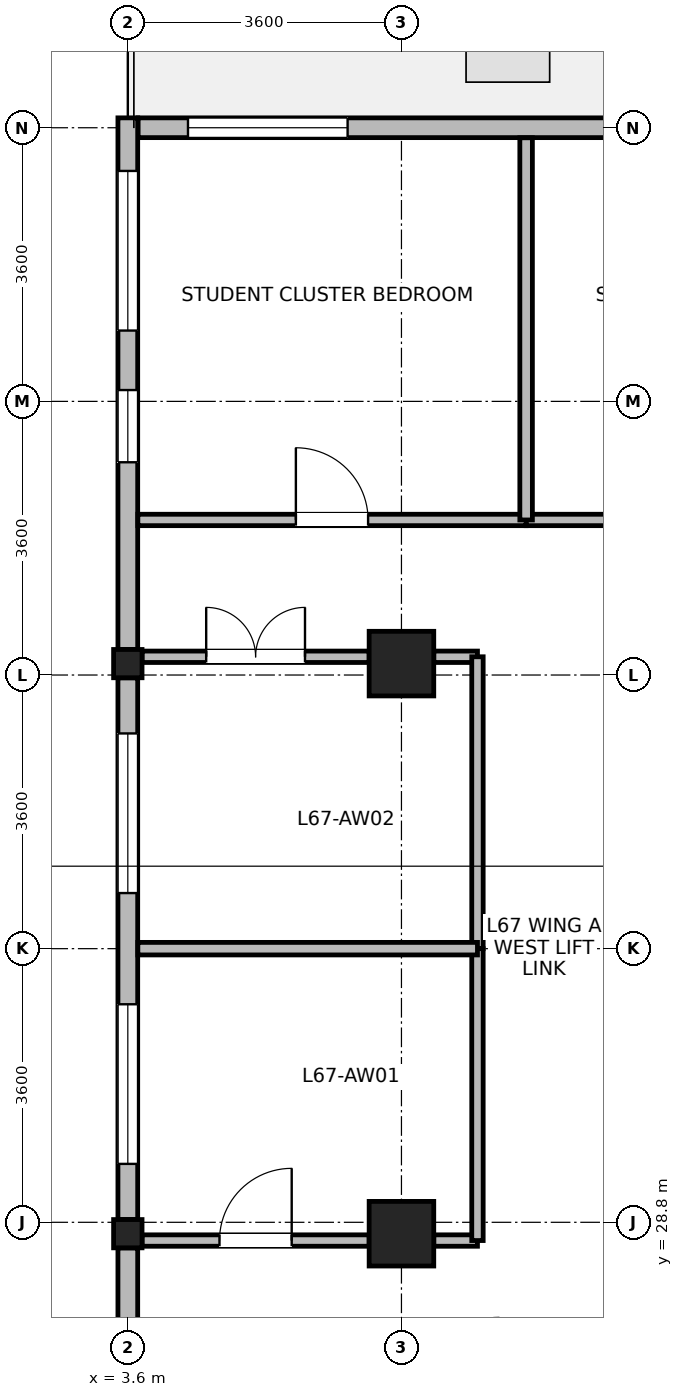
"""IFC4 building model, lengths in metres.
Left out: names, types, materials, properties, quantities, classifications, styles, units other than length and angle.
Written with IfcOpenShell. Run it as: python <this file> out.ifc"""

import sys

from ifc_helpers import new_model, si_unit, direction, frame, frame_2d, origin, origin_2d, place, context, subcontext, project, spatial, rectangle, i_section, extrude, source, transform, mapped, element, fill, save


model = new_model("IFC4")
c1 = context("Model", 3, precision=1e-05, world=origin(), true_north=direction((0.0, 1.0)))
c2 = subcontext(c1, "Body", "Model", "MODEL_VIEW")
j1 = project(units=[si_unit("LENGTHUNIT", "METRE"), si_unit("PLANEANGLEUNIT", "RADIAN")], contexts=[c1])
p1 = place(None, origin())
s1 = spatial("IfcSite", under=j1, at=p1, CompositionType="ELEMENT")
p2 = place(p1, origin())
s2 = spatial("IfcBuilding", under=s1, at=p2, CompositionType="ELEMENT")
p3 = place(p2, frame((0.0, 0.0, 261.0)))
s3 = spatial("IfcBuildingStorey", under=s2, at=p3, CompositionType="ELEMENT", Elevation=261.0)
m1 = source(origin(), c2, "Body", "SweptSolid", [
    extrude(rectangle(XDim=0.85, YDim=0.85, at=origin_2d()), origin(), (0.0, 0.0, 1.0), 3.7),
])
for number, where, z_axis, x_axis in (
    (1, (7.2, 28.65, 0.0), (0.0, 0.0, 1.0), (1.0, 0.0, 0.0)),
    (2, (7.2, 36.15, 0.0), (0.0, 0.0, 1.0), (1.0, 0.0, 0.0)),
):
    element("IfcColumn", number, at=place(p3, frame(where, z_axis=z_axis, x_axis=x_axis)), inside=s3, PredefinedType="COLUMN", context=c2, shape_type="MappedRepresentation", body=[
        mapped(m1, transform((0.0, 0.0, 0.0), x_axis=(1.0, 0.0, 0.0), y_axis=(0.0, 1.0, 0.0), z_axis=(0.0, 0.0, 1.0), scale=1.0)),
    ])
m2 = source(origin(), c2, "Body", "SweptSolid", [
    extrude(i_section(OverallWidth=0.374, OverallDepth=0.372, WebThickness=0.015, FlangeThickness=0.026, FilletRadius=0.015, at=origin_2d()), origin(), (0.0, 0.0, 1.0), 3.7),
])
for number, where, z_axis, x_axis in (
    (3, (3.6, 28.65, 0.0), (0.0, 0.0, 1.0), (1.0, 0.0, 0.0)),
    (4, (3.6, 36.15, 0.0), (0.0, 0.0, 1.0), (1.0, 0.0, 0.0)),
):
    element("IfcColumn", number, at=place(p3, frame(where, z_axis=z_axis, x_axis=x_axis)), inside=s3, PredefinedType="COLUMN", context=c2, shape_type="MappedRepresentation", body=[
        mapped(m2, transform((0.0, 0.0, 0.0), x_axis=(1.0, 0.0, 0.0), y_axis=(0.0, 1.0, 0.0), z_axis=(0.0, 0.0, 1.0), scale=1.0)),
    ])
p4 = place(p3, frame((3.735, 43.2, 0.0), z_axis=(0.0, 0.0, 1.0), x_axis=(1.0, 0.0, 0.0)))
e5 = element("IfcWall", 5, at=p4, inside=s3, PredefinedType="STANDARD", context=c2, shape_type="SweptSolid", body=[
    extrude(rectangle(XDim=10.239, YDim=0.26, at=frame_2d((5.12, 0.0))), origin(), (0.0, 0.0, 1.0), 3.455),
])
p5 = place(p4, frame((0.656, 0.0, 0.85)))
e6 = element("IfcOpeningElement", 6, at=p5, cuts=e5, PredefinedType="OPENING", context=c2, shape_type="SweptSolid", body=[
    extrude(rectangle(XDim=2.1, YDim=1.95, at=frame_2d((1.05, 0.975))), frame((0.0, 0.14, 0.0), z_axis=(0.0, -1.0, 0.0), x_axis=(1.0, 0.0, 0.0)), (0.0, 0.0, 1.0), 0.28),
])
p6 = place(p4, frame((7.482, 0.0, 0.85)))
e7 = element("IfcOpeningElement", 7, at=p6, cuts=e5, PredefinedType="OPENING", context=c2, shape_type="SweptSolid", body=[
    extrude(rectangle(XDim=2.1, YDim=1.95, at=frame_2d((1.05, 0.975))), frame((0.0, 0.14, 0.0), z_axis=(0.0, -1.0, 0.0), x_axis=(1.0, 0.0, 0.0)), (0.0, 0.0, 1.0), 0.28),
])
p7 = place(p3, frame((3.6, 36.337, 0.0), z_axis=(0.0, 0.0, 1.0), x_axis=(0.0, 1.0, 0.0)))
e8 = element("IfcWall", 8, at=p7, inside=s3, PredefinedType="STANDARD", context=c2, shape_type="SweptSolid", body=[
    extrude(rectangle(XDim=6.993, YDim=0.26, at=frame_2d((3.497, 0.0))), origin(), (0.0, 0.0, 1.0), 3.455),
])
p8 = place(p7, frame((4.195, 0.0, 0.85)))
e9 = element("IfcOpeningElement", 9, at=p8, cuts=e8, PredefinedType="OPENING", context=c2, shape_type="SweptSolid", body=[
    extrude(rectangle(XDim=2.1, YDim=1.95, at=frame_2d((1.05, 0.975))), frame((0.0, 0.14, 0.0), z_axis=(0.0, -1.0, 0.0), x_axis=(1.0, 0.0, 0.0)), (0.0, 0.0, 1.0), 0.28),
])
p9 = place(p7, frame((2.462, 0.0, 0.85)))
e10 = element("IfcOpeningElement", 10, at=p9, cuts=e8, PredefinedType="OPENING", context=c2, shape_type="SweptSolid", body=[
    extrude(rectangle(XDim=0.95, YDim=1.75, at=frame_2d((0.475, 0.875))), frame((0.0, 0.14, 0.0), z_axis=(0.0, -1.0, 0.0), x_axis=(1.0, 0.0, 0.0)), (0.0, 0.0, 1.0), 0.28),
])
p10 = place(p3, frame((3.6, 28.837, 0.0), z_axis=(0.0, 0.0, 1.0), x_axis=(0.0, 1.0, 0.0)))
e11 = element("IfcWall", 11, at=p10, inside=s3, PredefinedType="STANDARD", context=c2, shape_type="SweptSolid", body=[
    extrude(rectangle(XDim=7.126, YDim=0.26, at=frame_2d((3.563, 0.0))), origin(), (0.0, 0.0, 1.0), 3.055),
])
p11 = place(p10, frame((0.731, 0.0, 0.85)))
e12 = element("IfcOpeningElement", 12, at=p11, cuts=e11, PredefinedType="OPENING", context=c2, shape_type="SweptSolid", body=[
    extrude(rectangle(XDim=2.1, YDim=1.95, at=frame_2d((1.05, 0.975))), frame((0.0, 0.14, 0.0), z_axis=(0.0, -1.0, 0.0), x_axis=(1.0, 0.0, 0.0)), (0.0, 0.0, 1.0), 0.28),
])
p12 = place(p10, frame((4.294, 0.0, 0.85)))
e13 = element("IfcOpeningElement", 13, at=p12, cuts=e11, PredefinedType="OPENING", context=c2, shape_type="SweptSolid", body=[
    extrude(rectangle(XDim=2.1, YDim=1.95, at=frame_2d((1.05, 0.975))), frame((0.0, 0.14, 0.0), z_axis=(0.0, -1.0, 0.0), x_axis=(1.0, 0.0, 0.0)), (0.0, 0.0, 1.0), 0.28),
])
p13 = place(p3, frame((3.6, 21.47, 0.0), z_axis=(0.0, 0.0, 1.0), x_axis=(0.0, 1.0, 0.0)))
e14 = element("IfcWall", 14, at=p13, inside=s3, PredefinedType="STANDARD", context=c2, shape_type="SweptSolid", body=[
    extrude(rectangle(XDim=6.993, YDim=0.26, at=frame_2d((3.497, 0.0))), origin(), (0.0, 0.0, 1.0), 3.455),
])
p14 = place(p13, frame((0.698, 0.0, 0.85)))
e15 = element("IfcOpeningElement", 15, at=p14, cuts=e14, PredefinedType="OPENING", context=c2, shape_type="SweptSolid", body=[
    extrude(rectangle(XDim=2.1, YDim=1.95, at=frame_2d((1.05, 0.975))), frame((0.0, 0.14, 0.0), z_axis=(0.0, -1.0, 0.0), x_axis=(1.0, 0.0, 0.0)), (0.0, 0.0, 1.0), 0.28),
])
p15 = place(p13, frame((3.581, 0.0, 0.85)))
e16 = element("IfcOpeningElement", 16, at=p15, cuts=e14, PredefinedType="OPENING", context=c2, shape_type="SweptSolid", body=[
    extrude(rectangle(XDim=0.95, YDim=1.75, at=frame_2d((0.475, 0.875))), frame((0.0, 0.14, 0.0), z_axis=(0.0, -1.0, 0.0), x_axis=(1.0, 0.0, 0.0)), (0.0, 0.0, 1.0), 0.28),
])
p16 = place(p3, frame((8.84, 38.04, 0.0), z_axis=(0.0, 0.0, 1.0), x_axis=(1.0, 0.0, 0.0)))
e17 = element("IfcWall", 17, at=p16, inside=s3, PredefinedType="PARTITIONING", context=c2, shape_type="SweptSolid", body=[
    extrude(rectangle(XDim=5.66, YDim=0.15, at=frame_2d((2.83, 0.0))), origin(), (0.0, 0.0, 1.0), 3.455),
])
p17 = place(p16, frame((2.355, 0.0, 0.0)))
e18 = element("IfcOpeningElement", 18, at=p17, cuts=e17, PredefinedType="OPENING", context=c2, shape_type="SweptSolid", body=[
    extrude(rectangle(XDim=0.95, YDim=2.1, at=frame_2d((0.475, 1.05))), frame((0.0, 0.085, 0.0), z_axis=(0.0, -1.0, 0.0), x_axis=(1.0, 0.0, 0.0)), (0.0, 0.0, 1.0), 0.17),
])
p18 = place(p3, frame((3.732, 38.04, 0.0), z_axis=(0.0, 0.0, 1.0), x_axis=(1.0, 0.0, 0.0)))
e19 = element("IfcWall", 19, at=p18, inside=s3, PredefinedType="PARTITIONING", context=c2, shape_type="SweptSolid", body=[
    extrude(rectangle(XDim=5.108, YDim=0.15, at=frame_2d((2.554, 0.0))), origin(), (0.0, 0.0, 1.0), 3.455),
])
p19 = place(p18, frame((2.079, 0.0, 0.0)))
e20 = element("IfcOpeningElement", 20, at=p19, cuts=e19, PredefinedType="OPENING", context=c2, shape_type="SweptSolid", body=[
    extrude(rectangle(XDim=0.95, YDim=2.1, at=frame_2d((0.475, 1.05))), frame((0.0, 0.085, 0.0), z_axis=(0.0, -1.0, 0.0), x_axis=(1.0, 0.0, 0.0)), (0.0, 0.0, 1.0), 0.17),
])
p20 = place(p3, frame((3.787, 28.56, 0.0), z_axis=(0.0, 0.0, 1.0), x_axis=(1.0, 0.0, 0.0)))
e21 = element("IfcWall", 21, at=p20, inside=s3, PredefinedType="PARTITIONING", context=c2, shape_type="SweptSolid", body=[
    extrude(rectangle(XDim=2.988, YDim=0.15, at=frame_2d((1.494, 0.0))), origin(), (0.0, 0.0, 1.0), 2.905),
])
p21 = place(p20, frame((1.019, 0.0, 0.0)))
e22 = element("IfcOpeningElement", 22, at=p21, cuts=e21, PredefinedType="OPENING", context=c2, shape_type="SweptSolid", body=[
    extrude(rectangle(XDim=0.95, YDim=2.1, at=frame_2d((0.475, 1.05))), frame((0.0, 0.085, 0.0), z_axis=(0.0, -1.0, 0.0), x_axis=(1.0, 0.0, 0.0)), (0.0, 0.0, 1.0), 0.17),
])
p22 = place(p3, frame((7.625, 28.56, 0.0), z_axis=(0.0, 0.0, 1.0), x_axis=(1.0, 0.0, 0.0)))
e23 = element("IfcWall", 23, at=p22, inside=s3, PredefinedType="PARTITIONING", context=c2, shape_type="SweptSolid", body=[
    extrude(rectangle(XDim=0.575, YDim=0.15, at=frame_2d((0.288, 0.0))), origin(), (0.0, 0.0, 1.0), 2.905),
])
p23 = place(p3, frame((3.787, 36.24, 0.0), z_axis=(0.0, 0.0, 1.0), x_axis=(1.0, 0.0, 0.0)))
e24 = element("IfcWall", 24, at=p23, inside=s3, PredefinedType="PARTITIONING", context=c2, shape_type="SweptSolid", body=[
    extrude(rectangle(XDim=2.988, YDim=0.15, at=frame_2d((1.494, 0.0))), origin(), (0.0, 0.0, 1.0), 2.905),
])
p24 = place(p23, frame((0.844, 0.0, 0.0)))
e25 = element("IfcOpeningElement", 25, at=p24, cuts=e24, PredefinedType="OPENING", context=c2, shape_type="SweptSolid", body=[
    extrude(rectangle(XDim=1.3, YDim=2.12, at=frame_2d((0.65, 1.06))), frame((0.0, 0.085, 0.0), z_axis=(0.0, -1.0, 0.0), x_axis=(1.0, 0.0, 0.0)), (0.0, 0.0, 1.0), 0.17),
])
p25 = place(p3, frame((7.625, 36.24, 0.0), z_axis=(0.0, 0.0, 1.0), x_axis=(1.0, 0.0, 0.0)))
e26 = element("IfcWall", 26, at=p25, inside=s3, PredefinedType="PARTITIONING", context=c2, shape_type="SweptSolid", body=[
    extrude(rectangle(XDim=0.575, YDim=0.15, at=frame_2d((0.288, 0.0))), origin(), (0.0, 0.0, 1.0), 2.905),
])
p26 = place(p3, frame((8.2, 32.4, 0.0), z_axis=(0.0, 0.0, 1.0), x_axis=(0.0, 1.0, 0.0)))
e27 = element("IfcWall", 27, at=p26, inside=s3, PredefinedType="PARTITIONING", context=c2, shape_type="SweptSolid", body=[
    extrude(rectangle(XDim=3.84, YDim=0.15, at=frame_2d((1.92, 0.0))), origin(), (0.0, 0.0, 1.0), 3.455),
])
p27 = place(p3, frame((8.2, 28.56, 0.0), z_axis=(0.0, 0.0, 1.0), x_axis=(0.0, 1.0, 0.0)))
e28 = element("IfcWall", 28, at=p27, inside=s3, PredefinedType="PARTITIONING", context=c2, shape_type="SweptSolid", body=[
    extrude(rectangle(XDim=3.84, YDim=0.15, at=frame_2d((1.92, 0.0))), origin(), (0.0, 0.0, 1.0), 3.455),
])
p28 = place(p3, frame((8.84, 38.04, 0.0), z_axis=(0.0, 0.0, 1.0), x_axis=(0.0, 1.0, 0.0)))
e29 = element("IfcWall", 29, at=p28, inside=s3, PredefinedType="PARTITIONING", context=c2, shape_type="SweptSolid", body=[
    extrude(rectangle(XDim=5.028, YDim=0.165, at=frame_2d((2.514, 0.0))), origin(), (0.0, 0.0, 1.0), 3.455),
])
p29 = place(p3, frame((3.732, 32.4, 0.0), z_axis=(0.0, 0.0, 1.0), x_axis=(1.0, 0.0, 0.0)))
e30 = element("IfcWall", 30, at=p29, inside=s3, PredefinedType="PARTITIONING", context=c2, shape_type="SweptSolid", body=[
    extrude(rectangle(XDim=4.468, YDim=0.165, at=frame_2d((2.234, 0.0))), origin(), (0.0, 0.0, 1.0), 3.455),
])
p30 = place(p5, origin())
e31 = element("IfcWindow", 31, at=p30, inside=s3, PartitioningType="SINGLE_PANEL", PredefinedType="WINDOW", context=c2, shape_type="SweptSolid", body=[
    extrude(rectangle(XDim=2.1, YDim=1.95, at=frame_2d((1.05, 0.975))), frame((0.0, 0.03, 0.0), z_axis=(0.0, -1.0, 0.0), x_axis=(1.0, 0.0, 0.0)), (0.0, 0.0, 1.0), 0.06),
])
fill(e6, e31)
p31 = place(p8, origin())
e32 = element("IfcWindow", 32, at=p31, inside=s3, PartitioningType="SINGLE_PANEL", PredefinedType="WINDOW", context=c2, shape_type="SweptSolid", body=[
    extrude(rectangle(XDim=2.1, YDim=1.95, at=frame_2d((1.05, 0.975))), frame((0.0, 0.03, 0.0), z_axis=(0.0, -1.0, 0.0), x_axis=(1.0, 0.0, 0.0)), (0.0, 0.0, 1.0), 0.06),
])
fill(e9, e32)
p32 = place(p9, origin())
e33 = element("IfcWindow", 33, at=p32, inside=s3, PartitioningType="SINGLE_PANEL", PredefinedType="WINDOW", context=c2, shape_type="SweptSolid", body=[
    extrude(rectangle(XDim=0.95, YDim=1.75, at=frame_2d((0.475, 0.875))), frame((0.0, 0.03, 0.0), z_axis=(0.0, -1.0, 0.0), x_axis=(1.0, 0.0, 0.0)), (0.0, 0.0, 1.0), 0.06),
])
fill(e10, e33)
p33 = place(p11, origin())
e34 = element("IfcWindow", 34, at=p33, inside=s3, PartitioningType="SINGLE_PANEL", PredefinedType="WINDOW", context=c2, shape_type="SweptSolid", body=[
    extrude(rectangle(XDim=2.1, YDim=1.95, at=frame_2d((1.05, 0.975))), frame((0.0, 0.03, 0.0), z_axis=(0.0, -1.0, 0.0), x_axis=(1.0, 0.0, 0.0)), (0.0, 0.0, 1.0), 0.06),
])
fill(e12, e34)
p34 = place(p12, origin())
e35 = element("IfcWindow", 35, at=p34, inside=s3, PartitioningType="SINGLE_PANEL", PredefinedType="WINDOW", context=c2, shape_type="SweptSolid", body=[
    extrude(rectangle(XDim=2.1, YDim=1.95, at=frame_2d((1.05, 0.975))), frame((0.0, 0.03, 0.0), z_axis=(0.0, -1.0, 0.0), x_axis=(1.0, 0.0, 0.0)), (0.0, 0.0, 1.0), 0.06),
])
fill(e13, e35)
p35 = place(p19, origin())
e36 = element("IfcDoor", 36, at=p35, inside=s3, OperationType="SINGLE_SWING_LEFT", PredefinedType="DOOR", context=c2, shape_type="SweptSolid", body=[
    extrude(rectangle(XDim=0.95, YDim=2.1, at=frame_2d((0.475, 1.05))), frame((0.0, 0.025, 0.0), z_axis=(0.0, -1.0, 0.0), x_axis=(1.0, 0.0, 0.0)), (0.0, 0.0, 1.0), 0.05),
])
fill(e20, e36)
p36 = place(p21, origin())
e37 = element("IfcDoor", 37, at=p36, inside=s3, OperationType="SINGLE_SWING_RIGHT", PredefinedType="DOOR", context=c2, shape_type="SweptSolid", body=[
    extrude(rectangle(XDim=0.95, YDim=2.1, at=frame_2d((0.475, 1.05))), frame((0.0, 0.025, 0.0), z_axis=(0.0, -1.0, 0.0), x_axis=(1.0, 0.0, 0.0)), (0.0, 0.0, 1.0), 0.05),
])
fill(e22, e37)
p37 = place(p24, origin())
e38 = element("IfcDoor", 38, at=p37, inside=s3, OperationType="DOUBLE_DOOR_SINGLE_SWING", PredefinedType="DOOR", context=c2, shape_type="SweptSolid", body=[
    extrude(rectangle(XDim=1.3, YDim=2.12, at=frame_2d((0.65, 1.06))), frame((0.0, 0.025, 0.0), z_axis=(0.0, -1.0, 0.0), x_axis=(1.0, 0.0, 0.0)), (0.0, 0.0, 1.0), 0.05),
])
fill(e25, e38)
save(model, sys.argv[1])
